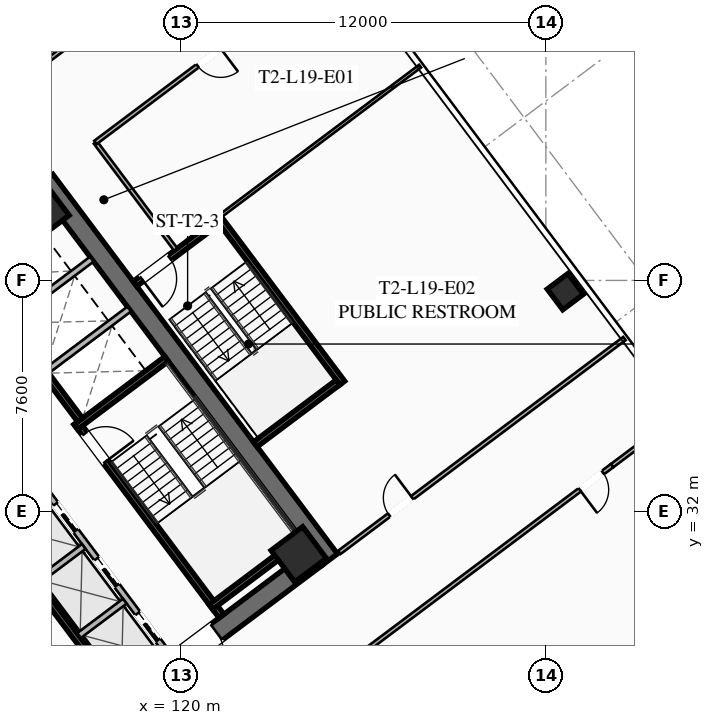
"""IFC4 building model, lengths in metres.
Left out: names, types, materials, properties, quantities, classifications, styles, units other than length and angle.
Written with IfcOpenShell. Run it as: python <this file> out.ifc"""

import sys

from ifc_helpers import new_model, si_unit, direction, frame, frame_2d, origin, origin_2d, place, context, subcontext, project, spatial, rectangle, hollow_rectangle, extrude, element, fill, save


model = new_model("IFC4")
c1 = context("Model", 3, precision=1e-05, world=origin(), true_north=direction((0.0, 1.0)))
c2 = subcontext(c1, "Body", "Model", "MODEL_VIEW")
j1 = project(units=[si_unit("LENGTHUNIT", "METRE"), si_unit("PLANEANGLEUNIT", "RADIAN")], contexts=[c1])
p1 = place(None, origin())
s1 = spatial("IfcSite", under=j1, at=p1, CompositionType="ELEMENT")
p2 = place(p1, origin())
s2 = spatial("IfcBuilding", under=s1, at=p2, CompositionType="ELEMENT")
p3 = place(p2, frame((0.0, 0.0, 74.3)))
s3 = spatial("IfcBuildingStorey", under=s2, at=p3, CompositionType="ELEMENT", Elevation=74.3)
p4 = place(p3, frame((115.524, 42.893, 0.0), z_axis=(0.0, 0.0, 1.0), x_axis=(0.600005007985, -0.799996243986, 0.0)))
e1 = element("IfcWall", 1, at=p4, inside=s3, PredefinedType="SHEAR", context=c2, shape_type="SweptSolid", body=[
    extrude(rectangle(XDim=15.6, YDim=0.65, at=frame_2d((7.8, 0.0))), origin(), (0.0, 0.0, 1.0), 3.55),
])
p5 = place(p3, frame((124.429, 30.478, 0.0), z_axis=(0.0, 0.0, 1.0), x_axis=(-0.799998028465, -0.600002628705, 0.0)))
e2 = element("IfcWall", 2, at=p5, inside=s3, PredefinedType="SHEAR", context=c2, shape_type="SweptSolid", body=[
    extrude(rectangle(XDim=14.86, YDim=0.65, at=frame_2d((7.43, 0.0))), origin(), (0.0, 0.0, 1.0), 3.55),
])
p6 = place(p5, frame((9.13, 0.0, 0.0)))
e3 = element("IfcOpeningElement", 3, at=p6, cuts=e2, PredefinedType="OPENING", context=c2, shape_type="SweptSolid", body=[
    extrude(rectangle(XDim=1.25, YDim=2.25, at=frame_2d((0.625, 1.125))), frame((0.0, 0.335, 0.0), z_axis=(0.0, -1.0, 0.0), x_axis=(1.0, 0.0, 0.0)), (0.0, 0.0, 1.0), 0.67),
])
p7 = place(p5, frame((4.08, 0.0, 0.0)))
e4 = element("IfcOpeningElement", 4, at=p7, cuts=e2, PredefinedType="OPENING", context=c2, shape_type="SweptSolid", body=[
    extrude(rectangle(XDim=1.25, YDim=2.25, at=frame_2d((0.625, 1.125))), frame((0.0, 0.335, 0.0), z_axis=(0.0, -1.0, 0.0), x_axis=(1.0, 0.0, 0.0)), (0.0, 0.0, 1.0), 0.67),
])
for number, where, z_axis, x_axis in (
    (5, (123.87, 30.59, 0.0), (0.0, 0.0, 1.0), (0.8, 0.6, 0.0)),
    (6, (115.41, 41.87, 0.0), (0.0, 0.0, 1.0), (0.8, 0.6, 0.0)),
):
    element("IfcColumn", number, at=place(p3, frame(where, z_axis=z_axis, x_axis=x_axis)), inside=s3, PredefinedType="COLUMN", context=c2, shape_type="SweptSolid", body=[
        extrude(hollow_rectangle(XDim=1.3, YDim=1.3, WallThickness=0.05, at=origin_2d()), origin(), (0.0, 0.0, 1.0), 3.35),
    ])
p8 = place(p3, frame((132.64, 39.23, 0.0), z_axis=(0.0, 0.0, 1.0), x_axis=(0.799999996291, 0.600000004945, 0.0)))
e7 = element("IfcColumn", 7, at=p8, inside=s3, PredefinedType="COLUMN", context=c2, shape_type="SweptSolid", body=[
    extrude(hollow_rectangle(XDim=0.85, YDim=0.85, WallThickness=0.035, at=origin_2d()), origin(), (0.0, 0.0, 1.0), 3.35),
])
p9 = place(p3, frame((116.56, 34.92, 0.0), z_axis=(0.0, 0.0, 1.0), x_axis=(0.600009827119, -0.799992629566, 0.0)))
e8 = element("IfcWall", 8, at=p9, inside=s3, PredefinedType="SHEAR", context=c2, shape_type="SweptSolid", body=[
    extrude(rectangle(XDim=7.95, YDim=0.2, at=frame_2d((3.975, 0.0))), origin(), (0.0, 0.0, 1.0), 3.35),
])
p10 = place(p9, frame((0.45, 0.0, 0.0)))
e9 = element("IfcOpeningElement", 9, at=p10, cuts=e8, PredefinedType="OPENING", context=c2, shape_type="SweptSolid", body=[
    extrude(rectangle(XDim=1.15, YDim=2.2, at=frame_2d((0.575, 1.1))), frame((0.0, 0.11, 0.0), z_axis=(0.0, -1.0, 0.0), x_axis=(1.0, 0.0, 0.0)), (0.0, 0.0, 1.0), 0.22),
])
for number, where, z_axis, x_axis in (
    (10, (116.54, 34.78, 0.0), (0.0, 0.0, 1.0), (0.8, 0.6, 0.0)),
    (11, (120.98, 28.86, 0.0), (0.0, 0.0, 1.0), (0.8, 0.6, 0.0)),
):
    element("IfcWall", number, at=place(p3, frame(where, z_axis=z_axis, x_axis=x_axis)), inside=s3, PredefinedType="SHEAR", context=c2, shape_type="SweptSolid", body=[
        extrude(rectangle(XDim=3.73, YDim=0.2, at=frame_2d((1.865, 0.0))), origin(), (0.0, 0.0, 1.0), 3.35),
    ])
p11 = place(p3, frame((117.938, 26.016, 0.0), z_axis=(0.0, 0.0, 1.0), x_axis=(-0.600005463273, 0.799995902516, 0.0)))
e12 = element("IfcWall", 12, at=p11, inside=s3, PredefinedType="SHEAR", context=c2, shape_type="SweptSolid", body=[
    extrude(rectangle(XDim=14.3, YDim=0.2, at=frame_2d((7.15, 0.0))), origin(), (0.0, 0.0, 1.0), 3.35),
])
p12 = place(p3, frame((112.87, 40.09, 0.0), z_axis=(0.0, 0.0, 1.0), x_axis=(0.599975393228, -0.800018454488, 0.0)))
e13 = element("IfcWall", 13, at=p12, inside=s3, PredefinedType="SHEAR", context=c2, shape_type="SweptSolid", body=[
    extrude(rectangle(XDim=6.35, YDim=0.2, at=frame_2d((3.175, 0.0))), origin(), (0.0, 0.0, 1.0), 3.35),
])
for number, where, z_axis, x_axis in (
    (14, (115.59, 36.63, 0.0), (0.0, 0.0, 1.0), (0.8, 0.6, 0.0)),
    (15, (114.36, 38.27, 0.0), (0.0, 0.0, 1.0), (0.8, 0.6, 0.0)),
):
    element("IfcWall", number, at=place(p3, frame(where, z_axis=z_axis, x_axis=x_axis)), inside=s3, PredefinedType="SOLIDWALL", context=c2, shape_type="SweptSolid", body=[
        extrude(rectangle(XDim=3.38, YDim=0.2, at=frame_2d((1.69, 0.0))), origin(), (0.0, 0.0, 1.0), 3.35),
    ])
p13 = place(p3, frame((119.61, 27.27, 0.0), z_axis=(0.0, 0.0, 1.0), x_axis=(-0.600011488909, 0.79999138319, 0.0)))
e16 = element("IfcWall", 16, at=p13, inside=s3, PredefinedType="SOLIDWALL", context=c2, shape_type="SweptSolid", body=[
    extrude(rectangle(XDim=6.8, YDim=0.2, at=frame_2d((3.4, 0.0))), origin(), (0.0, 0.0, 1.0), 3.35),
])
p14 = place(p13, frame((0.625, 0.0, 0.0)))
e17 = element("IfcOpeningElement", 17, at=p14, cuts=e16, PredefinedType="OPENING", context=c2, shape_type="SweptSolid", body=[
    extrude(rectangle(XDim=1.1, YDim=2.2, at=frame_2d((0.55, 1.1))), frame((0.0, 0.11, 0.0), z_axis=(0.0, -1.0, 0.0), x_axis=(1.0, 0.0, 0.0)), (0.0, 0.0, 1.0), 0.22),
])
p15 = place(p13, frame((2.875, 0.0, 0.0)))
e18 = element("IfcOpeningElement", 18, at=p15, cuts=e16, PredefinedType="OPENING", context=c2, shape_type="SweptSolid", body=[
    extrude(rectangle(XDim=1.1, YDim=2.2, at=frame_2d((0.55, 1.1))), frame((0.0, 0.11, 0.0), z_axis=(0.0, -1.0, 0.0), x_axis=(1.0, 0.0, 0.0)), (0.0, 0.0, 1.0), 0.22),
])
p16 = place(p13, frame((5.125, 0.0, 0.0)))
e19 = element("IfcOpeningElement", 19, at=p16, cuts=e16, PredefinedType="OPENING", context=c2, shape_type="SweptSolid", body=[
    extrude(rectangle(XDim=1.1, YDim=2.2, at=frame_2d((0.55, 1.1))), frame((0.0, 0.11, 0.0), z_axis=(0.0, -1.0, 0.0), x_axis=(1.0, 0.0, 0.0)), (0.0, 0.0, 1.0), 0.22),
])
p17 = place(p3, frame((116.646, 27.922, 0.0), z_axis=(0.0, 0.0, 1.0), x_axis=(0.8, 0.6, 0.0)))
e20 = element("IfcWall", 20, at=p17, inside=s3, PredefinedType="SOLIDWALL", context=c2, shape_type="SweptSolid", body=[
    extrude(rectangle(XDim=1.88, YDim=0.2, at=frame_2d((0.94, 0.0))), origin(), (0.0, 0.0, 1.0), 3.35),
])
p18 = place(p3, frame((115.296, 29.722, 0.0), z_axis=(0.0, 0.0, 1.0), x_axis=(0.799984418148, 0.600020775241, 0.0)))
e21 = element("IfcWall", 21, at=p18, inside=s3, PredefinedType="SOLIDWALL", context=c2, shape_type="SweptSolid", body=[
    extrude(rectangle(XDim=1.88, YDim=0.2, at=frame_2d((0.94, 0.0))), origin(), (0.0, 0.0, 1.0), 3.35),
])
p19 = place(p3, frame((125.304, 36.228, 0.0), z_axis=(0.0, 0.0, 1.0), x_axis=(-0.59998851072, 0.800008616831, 0.0)))
e22 = element("IfcWall", 22, at=p19, inside=s3, PredefinedType="SHEAR", context=c2, shape_type="SweptSolid", body=[
    extrude(rectangle(XDim=6.8, YDim=0.2, at=frame_2d((3.4, 0.0))), origin(), (0.0, 0.0, 1.0), 3.35),
])
p20 = place(p3, frame((121.204, 41.528, 0.0), z_axis=(0.0, 0.0, 1.0), x_axis=(-0.800017232136, -0.599977023131, 0.0)))
e23 = element("IfcWall", 23, at=p20, inside=s3, PredefinedType="SHEAR", context=c2, shape_type="SweptSolid", body=[
    extrude(rectangle(XDim=3.4, YDim=0.2, at=frame_2d((1.7, 0.0))), origin(), (0.0, 0.0, 1.0), 3.35),
])
p21 = place(p20, frame((1.975, 0.0, 0.0)))
e24 = element("IfcOpeningElement", 24, at=p21, cuts=e23, PredefinedType="OPENING", context=c2, shape_type="SweptSolid", body=[
    extrude(rectangle(XDim=1.15, YDim=2.2, at=frame_2d((0.575, 1.1))), frame((0.0, 0.11, 0.0), z_axis=(0.0, -1.0, 0.0), x_axis=(1.0, 0.0, 0.0)), (0.0, 0.0, 1.0), 0.22),
])
p22 = place(p3, frame((122.444, 34.208, 0.0), z_axis=(0.0, 0.0, 1.0), x_axis=(0.79999138319, 0.600011488909, 0.0)))
e25 = element("IfcWall", 25, at=p22, inside=s3, PredefinedType="SHEAR", context=c2, shape_type="SweptSolid", body=[
    extrude(rectangle(XDim=3.4, YDim=0.2, at=frame_2d((1.7, 0.0))), origin(), (0.0, 0.0, 1.0), 3.35),
])
p23 = place(p3, frame((119.824, 40.618, 0.0), z_axis=(0.0, 0.0, 1.0), x_axis=(-0.599982243973, 0.800013316712, 0.0)))
e26 = element("IfcWall", 26, at=p23, inside=s3, PredefinedType="PARTITIONING", context=c2, shape_type="SweptSolid", body=[
    extrude(rectangle(XDim=4.4, YDim=0.135, at=frame_2d((2.2, 0.0))), origin(), (0.0, 0.0, 1.0), 2.703),
])
p24 = place(p3, frame((98.516, 34.012, 0.0), z_axis=(0.0, 0.0, 1.0), x_axis=(0.8, 0.6, 0.0)))
e27 = element("IfcWall", 27, at=p24, inside=s3, PredefinedType="PARTITIONING", context=c2, shape_type="SweptSolid", body=[
    extrude(rectangle(XDim=28.23, YDim=0.135, at=frame_2d((14.115, 0.0))), origin(), (0.0, 0.0, 1.0), 2.703),
])
p25 = place(p24, frame((0.3, 0.0, 0.0)))
e28 = element("IfcOpeningElement", 28, at=p25, cuts=e27, PredefinedType="OPENING", context=c2, shape_type="SweptSolid", body=[
    extrude(rectangle(XDim=0.95, YDim=2.05, at=frame_2d((0.475, 1.025))), frame((0.0, 0.077, 0.0), z_axis=(0.0, -1.0, 0.0), x_axis=(1.0, 0.0, 0.0)), (0.0, 0.0, 1.0), 0.155),
])
p26 = place(p24, frame((6.84, 0.0, 0.0)))
e29 = element("IfcOpeningElement", 29, at=p26, cuts=e27, PredefinedType="OPENING", context=c2, shape_type="SweptSolid", body=[
    extrude(rectangle(XDim=0.95, YDim=2.05, at=frame_2d((0.475, 1.025))), frame((0.0, 0.077, 0.0), z_axis=(0.0, -1.0, 0.0), x_axis=(1.0, 0.0, 0.0)), (0.0, 0.0, 1.0), 0.155),
])
p27 = place(p24, frame((10.863, 0.0, 0.0)))
e30 = element("IfcOpeningElement", 30, at=p27, cuts=e27, PredefinedType="OPENING", context=c2, shape_type="SweptSolid", body=[
    extrude(rectangle(XDim=0.95, YDim=2.05, at=frame_2d((0.475, 1.025))), frame((0.0, 0.077, 0.0), z_axis=(0.0, -1.0, 0.0), x_axis=(1.0, 0.0, 0.0)), (0.0, 0.0, 1.0), 0.155),
])
p28 = place(p24, frame((26.98, 0.0, 0.0)))
e31 = element("IfcOpeningElement", 31, at=p28, cuts=e27, PredefinedType="OPENING", context=c2, shape_type="SweptSolid", body=[
    extrude(rectangle(XDim=0.95, YDim=2.05, at=frame_2d((0.475, 1.025))), frame((0.0, 0.077, 0.0), z_axis=(0.0, -1.0, 0.0), x_axis=(1.0, 0.0, 0.0)), (0.0, 0.0, 1.0), 0.155),
])
p29 = place(p3, frame((134.18, 33.51, 0.0), z_axis=(0.0, 0.0, 1.0), x_axis=(-0.8, -0.6, 0.0)))
e32 = element("IfcWall", 32, at=p29, inside=s3, PredefinedType="PARTITIONING", context=c2, shape_type="SweptSolid", body=[
    extrude(rectangle(XDim=28.23, YDim=0.135, at=frame_2d((14.115, 0.0))), origin(), (0.0, 0.0, 1.0), 2.703),
])
p30 = place(p29, frame((26.9, 0.0, 0.0)))
e33 = element("IfcOpeningElement", 33, at=p30, cuts=e32, PredefinedType="OPENING", context=c2, shape_type="SweptSolid", body=[
    extrude(rectangle(XDim=0.95, YDim=2.05, at=frame_2d((0.475, 1.025))), frame((0.0, 0.077, 0.0), z_axis=(0.0, -1.0, 0.0), x_axis=(1.0, 0.0, 0.0)), (0.0, 0.0, 1.0), 0.155),
])
p31 = place(p29, frame((20.399, 0.0, 0.0)))
e34 = element("IfcOpeningElement", 34, at=p31, cuts=e32, PredefinedType="OPENING", context=c2, shape_type="SweptSolid", body=[
    extrude(rectangle(XDim=0.95, YDim=2.05, at=frame_2d((0.475, 1.025))), frame((0.0, 0.077, 0.0), z_axis=(0.0, -1.0, 0.0), x_axis=(1.0, 0.0, 0.0)), (0.0, 0.0, 1.0), 0.155),
])
p32 = place(p29, frame((16.339, 0.0, 0.0)))
e35 = element("IfcOpeningElement", 35, at=p32, cuts=e32, PredefinedType="OPENING", context=c2, shape_type="SweptSolid", body=[
    extrude(rectangle(XDim=0.95, YDim=2.05, at=frame_2d((0.475, 1.025))), frame((0.0, 0.077, 0.0), z_axis=(0.0, -1.0, 0.0), x_axis=(1.0, 0.0, 0.0)), (0.0, 0.0, 1.0), 0.155),
])
p33 = place(p29, frame((0.38, 0.0, 0.0)))
e36 = element("IfcOpeningElement", 36, at=p33, cuts=e32, PredefinedType="OPENING", context=c2, shape_type="SweptSolid", body=[
    extrude(rectangle(XDim=0.95, YDim=2.05, at=frame_2d((0.475, 1.025))), frame((0.0, 0.077, 0.0), z_axis=(0.0, -1.0, 0.0), x_axis=(1.0, 0.0, 0.0)), (0.0, 0.0, 1.0), 0.155),
])
p34 = place(p3, frame((134.18, 33.51, 0.0), z_axis=(0.0, 0.0, 1.0), x_axis=(0.8000207031, 0.599972394874, 0.0)))
e37 = element("IfcWall", 37, at=p34, inside=s3, PredefinedType="PARTITIONING", context=c2, shape_type="SweptSolid", body=[
    extrude(rectangle(XDim=2.83, YDim=0.135, at=frame_2d((1.415, 0.0))), origin(), (0.0, 0.0, 1.0), 2.703),
])
p35 = place(p3, frame((125.224, 50.168, 0.0), z_axis=(0.0, 0.0, 1.0), x_axis=(-0.8, -0.6, 0.0)))
e38 = element("IfcWall", 38, at=p35, inside=s3, PredefinedType="PARTITIONING", context=c2, shape_type="SweptSolid", body=[
    extrude(rectangle(XDim=10.05, YDim=0.135, at=frame_2d((5.025, 0.0))), origin(), (0.0, 0.0, 1.0), 2.703),
])
p36 = place(p35, frame((4.9, 0.0, 0.0)))
e39 = element("IfcOpeningElement", 39, at=p36, cuts=e38, PredefinedType="OPENING", context=c2, shape_type="SweptSolid", body=[
    extrude(rectangle(XDim=0.95, YDim=2.05, at=frame_2d((0.475, 1.025))), frame((0.0, 0.077, 0.0), z_axis=(0.0, -1.0, 0.0), x_axis=(1.0, 0.0, 0.0)), (0.0, 0.0, 1.0), 0.155),
])
p37 = place(p3, frame((125.208, 30.656, 0.0), z_axis=(0.0, 0.0, 1.0), x_axis=(0.8, 0.6, 0.0)))
e40 = element("IfcWall", 40, at=p37, inside=s3, PredefinedType="PARTITIONING", context=c2, shape_type="SweptSolid", body=[
    extrude(rectangle(XDim=11.72, YDim=0.135, at=frame_2d((5.86, 0.0))), origin(), (0.0, 0.0, 1.0), 2.703),
])
p38 = place(p37, frame((2.045, 0.0, 0.0)))
e41 = element("IfcOpeningElement", 41, at=p38, cuts=e40, PredefinedType="OPENING", context=c2, shape_type="SweptSolid", body=[
    extrude(rectangle(XDim=0.95, YDim=2.05, at=frame_2d((0.475, 1.025))), frame((0.0, 0.077, 0.0), z_axis=(0.0, -1.0, 0.0), x_axis=(1.0, 0.0, 0.0)), (0.0, 0.0, 1.0), 0.155),
])
p39 = place(p3, frame((127.864, 46.648, 0.0), z_axis=(0.0, 0.0, 1.0), x_axis=(-0.800007145523, -0.599990472518, 0.0)))
e42 = element("IfcWall", 42, at=p39, inside=s3, PredefinedType="PARTITIONING", context=c2, shape_type="SweptSolid", body=[
    extrude(rectangle(XDim=8.2, YDim=0.11, at=frame_2d((4.1, 0.0))), origin(), (0.0, 0.0, 1.0), 2.703),
])
p40 = place(p7, origin())
e43 = element("IfcDoor", 43, at=p40, inside=s3, OperationType="SINGLE_SWING_RIGHT", PredefinedType="DOOR", context=c2, shape_type="SweptSolid", body=[
    extrude(rectangle(XDim=1.25, YDim=2.25, at=frame_2d((0.625, 1.125))), frame((0.0, 0.025, 0.0), z_axis=(0.0, -1.0, 0.0), x_axis=(1.0, 0.0, 0.0)), (0.0, 0.0, 1.0), 0.05),
])
fill(e4, e43)
p41 = place(p10, origin())
e44 = element("IfcDoor", 44, at=p41, inside=s3, OperationType="SINGLE_SWING_RIGHT", PredefinedType="DOOR", context=c2, shape_type="SweptSolid", body=[
    extrude(rectangle(XDim=1.15, YDim=2.2, at=frame_2d((0.575, 1.1))), frame((0.0, 0.025, 0.0), z_axis=(0.0, -1.0, 0.0), x_axis=(1.0, 0.0, 0.0)), (0.0, 0.0, 1.0), 0.05),
])
fill(e9, e44)
p42 = place(p21, origin())
e45 = element("IfcDoor", 45, at=p42, inside=s3, OperationType="SINGLE_SWING_RIGHT", PredefinedType="DOOR", context=c2, shape_type="SweptSolid", body=[
    extrude(rectangle(XDim=1.15, YDim=2.2, at=frame_2d((0.575, 1.1))), frame((0.0, 0.025, 0.0), z_axis=(0.0, -1.0, 0.0), x_axis=(1.0, 0.0, 0.0)), (0.0, 0.0, 1.0), 0.05),
])
fill(e24, e45)
p43 = place(p33, origin())
e46 = element("IfcDoor", 46, at=p43, inside=s3, OperationType="SINGLE_SWING_RIGHT", PredefinedType="DOOR", context=c2, shape_type="SweptSolid", body=[
    extrude(rectangle(XDim=0.95, YDim=2.05, at=frame_2d((0.475, 1.025))), frame((0.0, 0.025, 0.0), z_axis=(0.0, -1.0, 0.0), x_axis=(1.0, 0.0, 0.0)), (0.0, 0.0, 1.0), 0.05),
])
fill(e36, e46)
p44 = place(p36, origin())
e47 = element("IfcDoor", 47, at=p44, inside=s3, OperationType="SINGLE_SWING_LEFT", PredefinedType="DOOR", context=c2, shape_type="SweptSolid", body=[
    extrude(rectangle(XDim=0.95, YDim=2.05, at=frame_2d((0.475, 1.025))), frame((0.0, 0.025, 0.0), z_axis=(0.0, -1.0, 0.0), x_axis=(1.0, 0.0, 0.0)), (0.0, 0.0, 1.0), 0.05),
])
fill(e39, e47)
p45 = place(p38, origin())
e48 = element("IfcDoor", 48, at=p45, inside=s3, OperationType="SINGLE_SWING_RIGHT", PredefinedType="DOOR", context=c2, shape_type="SweptSolid", body=[
    extrude(rectangle(XDim=0.95, YDim=2.05, at=frame_2d((0.475, 1.025))), frame((0.0, 0.025, 0.0), z_axis=(0.0, -1.0, 0.0), x_axis=(1.0, 0.0, 0.0)), (0.0, 0.0, 1.0), 0.05),
])
fill(e41, e48)
p46 = place(p14, origin())
e49 = element("IfcDoor", 49, at=p46, inside=s3, OperationType="SLIDING_TO_LEFT", PredefinedType="DOOR", context=c2, shape_type="SweptSolid", body=[
    extrude(rectangle(XDim=1.1, YDim=2.2, at=frame_2d((0.55, 1.1))), frame((0.0, 0.025, 0.0), z_axis=(0.0, -1.0, 0.0), x_axis=(1.0, 0.0, 0.0)), (0.0, 0.0, 1.0), 0.05),
])
fill(e17, e49)
p47 = place(p15, origin())
e50 = element("IfcDoor", 50, at=p47, inside=s3, OperationType="SLIDING_TO_LEFT", PredefinedType="DOOR", context=c2, shape_type="SweptSolid", body=[
    extrude(rectangle(XDim=1.1, YDim=2.2, at=frame_2d((0.55, 1.1))), frame((0.0, 0.025, 0.0), z_axis=(0.0, -1.0, 0.0), x_axis=(1.0, 0.0, 0.0)), (0.0, 0.0, 1.0), 0.05),
])
fill(e18, e50)
p48 = place(p16, origin())
e51 = element("IfcDoor", 51, at=p48, inside=s3, OperationType="SLIDING_TO_LEFT", PredefinedType="DOOR", context=c2, shape_type="SweptSolid", body=[
    extrude(rectangle(XDim=1.1, YDim=2.2, at=frame_2d((0.55, 1.1))), frame((0.0, 0.025, 0.0), z_axis=(0.0, -1.0, 0.0), x_axis=(1.0, 0.0, 0.0)), (0.0, 0.0, 1.0), 0.05),
])
fill(e19, e51)
save(model, sys.argv[1])
